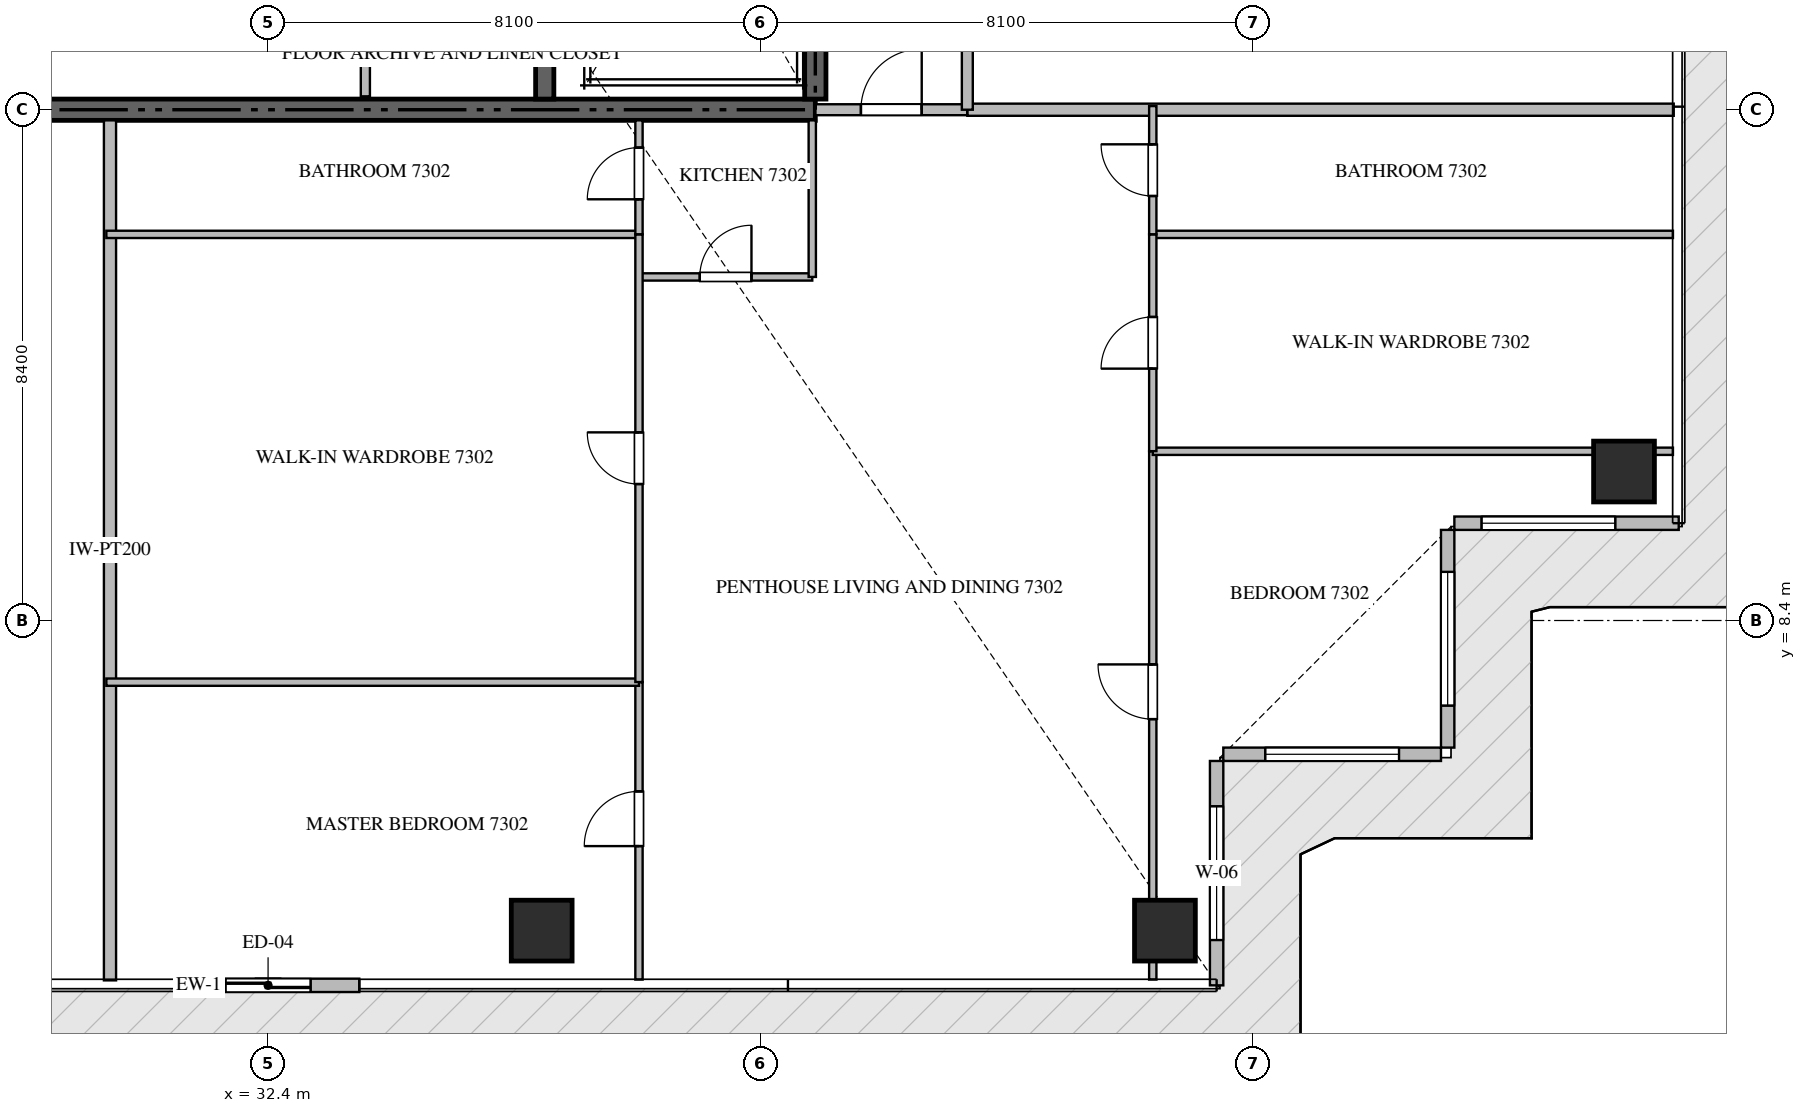
"""IFC4 building model, lengths in metres.
Left out: names, types, materials, properties, quantities, classifications, styles, units other than length and angle.
Written with IfcOpenShell. Run it as: python <this file> out.ifc"""

import sys

from ifc_helpers import new_model, si_unit, direction, frame, frame_2d, origin, origin_2d, place, context, subcontext, project, spatial, rectangle, extrude, source, transform, mapped, element, fill, save


model = new_model("IFC4")
c1 = context("Model", 3, precision=1e-05, world=origin(), true_north=direction((0.0, 1.0)))
c2 = subcontext(c1, "Body", "Model", "MODEL_VIEW")
j1 = project(units=[si_unit("LENGTHUNIT", "METRE"), si_unit("PLANEANGLEUNIT", "RADIAN")], contexts=[c1])
p1 = place(None, origin())
s1 = spatial("IfcSite", under=j1, at=p1, CompositionType="ELEMENT")
p2 = place(p1, origin())
s2 = spatial("IfcBuilding", under=s1, at=p2, CompositionType="ELEMENT")
p3 = place(p2, frame((0.0, 0.0, 293.45)))
s3 = spatial("IfcBuildingStorey", under=s2, at=p3, CompositionType="ELEMENT", Elevation=293.45)
p4 = place(p3, frame((23.4, 16.8, -0.26), z_axis=(0.0, 0.0, 1.0), x_axis=(1.0, 0.0, 0.0)))
e1 = element("IfcWall", 1, at=p4, inside=s3, PredefinedType="SHEAR", context=c2, shape_type="SweptSolid", body=[
    extrude(rectangle(XDim=18.0, YDim=0.35, at=frame_2d((9.0, 0.0))), origin(), (0.0, 0.0, 1.0), 4.048),
])
p5 = place(p3, frame((41.4, 16.975, -0.26), z_axis=(0.0, 0.0, 1.0), x_axis=(0.0, 1.0, 0.0)))
e2 = element("IfcWall", 2, at=p5, inside=s3, PredefinedType="SHEAR", context=c2, shape_type="SweptSolid", body=[
    extrude(rectangle(XDim=8.375, YDim=0.35, at=frame_2d((4.188, 0.0))), origin(), (0.0, 0.0, 1.0), 4.048),
])
p6 = place(p3, frame((36.95, 16.975, -0.26), z_axis=(0.0, 0.0, 1.0), x_axis=(0.0, 1.0, 0.0)))
e3 = element("IfcWall", 3, at=p6, inside=s3, PredefinedType="SHEAR", context=c2, shape_type="SweptSolid", body=[
    extrude(rectangle(XDim=8.375, YDim=0.3, at=frame_2d((4.188, 0.0))), origin(), (0.0, 0.0, 1.0), 4.048),
])
m1 = source(origin(), c2, "Body", "SweptSolid", [
    extrude(rectangle(XDim=1.0, YDim=1.0, at=origin_2d()), origin(), (0.0, 0.0, 1.0), 4.05),
])
for number, where, z_axis, x_axis in (
    (4, (36.9, 3.3, -0.26), (0.0, 0.0, 1.0), (1.0, 0.0, 0.0)),
    (5, (47.15, 3.3, -0.26), (0.0, 0.0, 1.0), (1.0, 0.0, 0.0)),
    (6, (54.7, 10.85, -0.26), (0.0, 0.0, 1.0), (1.0, 0.0, 0.0)),
):
    element("IfcColumn", number, at=place(p3, frame(where, z_axis=z_axis, x_axis=x_axis)), inside=s3, PredefinedType="COLUMN", context=c2, shape_type="MappedRepresentation", body=[
        mapped(m1, transform((0.0, 0.0, 0.0), scale=1.0)),
    ])
p7 = place(p3, frame((30.9, 2.4, 0.0), z_axis=(0.0, 0.0, 1.0), x_axis=(1.0, 0.0, 0.0)))
e7 = element("IfcWall", 7, at=p7, inside=s3, PredefinedType="ELEMENTEDWALL", context=c2, shape_type="SweptSolid", body=[
    extrude(rectangle(XDim=3.0, YDim=0.22, at=frame_2d((1.5, 0.0))), origin(), (0.0, 0.0, 1.0), 3.775),
])
p8 = place(p7, frame((0.8, 0.0, 0.0)))
e8 = element("IfcOpeningElement", 8, at=p8, cuts=e7, PredefinedType="OPENING", context=c2, shape_type="SweptSolid", body=[
    extrude(rectangle(XDim=1.4, YDim=2.25, at=frame_2d((0.7, 1.125))), frame((0.0, 0.12, 0.0), z_axis=(0.0, -1.0, 0.0), x_axis=(1.0, 0.0, 0.0)), (0.0, 0.0, 1.0), 0.24),
])
p9 = place(p3, frame((48.0, 2.4, 0.0), z_axis=(0.0, 0.0, 1.0), x_axis=(0.0, 1.0, 0.0)))
e9 = element("IfcWall", 9, at=p9, inside=s3, PredefinedType="ELEMENTEDWALL", context=c2, shape_type="SweptSolid", body=[
    extrude(rectangle(XDim=3.69, YDim=0.22, at=frame_2d((1.845, 0.0))), origin(), (0.0, 0.0, 1.0), 3.775),
])
p10 = place(p9, frame((0.745, 0.0, 0.65)))
e10 = element("IfcOpeningElement", 10, at=p10, cuts=e9, PredefinedType="OPENING", context=c2, shape_type="SweptSolid", body=[
    extrude(rectangle(XDim=2.2, YDim=2.4, at=frame_2d((1.1, 1.2))), frame((0.0, 0.12, 0.0), z_axis=(0.0, -1.0, 0.0), x_axis=(1.0, 0.0, 0.0)), (0.0, 0.0, 1.0), 0.24),
])
p11 = place(p3, frame((48.11, 6.2, 0.0), z_axis=(0.0, 0.0, 1.0), x_axis=(1.0, 0.0, 0.0)))
e11 = element("IfcWall", 11, at=p11, inside=s3, PredefinedType="ELEMENTEDWALL", context=c2, shape_type="SweptSolid", body=[
    extrude(rectangle(XDim=3.58, YDim=0.22, at=frame_2d((1.79, 0.0))), origin(), (0.0, 0.0, 1.0), 3.775),
])
p12 = place(p11, frame((0.69, 0.0, 0.65)))
e12 = element("IfcOpeningElement", 12, at=p12, cuts=e11, PredefinedType="OPENING", context=c2, shape_type="SweptSolid", body=[
    extrude(rectangle(XDim=2.2, YDim=2.4, at=frame_2d((1.1, 1.2))), frame((0.0, 0.12, 0.0), z_axis=(0.0, -1.0, 0.0), x_axis=(1.0, 0.0, 0.0)), (0.0, 0.0, 1.0), 0.24),
])
p13 = place(p3, frame((51.8, 6.31, 0.0), z_axis=(0.0, 0.0, 1.0), x_axis=(0.0, 1.0, 0.0)))
e13 = element("IfcWall", 13, at=p13, inside=s3, PredefinedType="ELEMENTEDWALL", context=c2, shape_type="SweptSolid", body=[
    extrude(rectangle(XDim=3.58, YDim=0.22, at=frame_2d((1.79, 0.0))), origin(), (0.0, 0.0, 1.0), 3.775),
])
p14 = place(p13, frame((0.69, 0.0, 0.65)))
e14 = element("IfcOpeningElement", 14, at=p14, cuts=e13, PredefinedType="OPENING", context=c2, shape_type="SweptSolid", body=[
    extrude(rectangle(XDim=2.2, YDim=2.4, at=frame_2d((1.1, 1.2))), frame((0.0, 0.12, 0.0), z_axis=(0.0, -1.0, 0.0), x_axis=(1.0, 0.0, 0.0)), (0.0, 0.0, 1.0), 0.24),
])
p15 = place(p3, frame((51.91, 10.0, 0.0), z_axis=(0.0, 0.0, 1.0), x_axis=(1.0, 0.0, 0.0)))
e15 = element("IfcWall", 15, at=p15, inside=s3, PredefinedType="ELEMENTEDWALL", context=c2, shape_type="SweptSolid", body=[
    extrude(rectangle(XDim=3.69, YDim=0.22, at=frame_2d((1.845, 0.0))), origin(), (0.0, 0.0, 1.0), 3.775),
])
p16 = place(p15, frame((0.447, 0.0, 0.65)))
e16 = element("IfcOpeningElement", 16, at=p16, cuts=e15, PredefinedType="OPENING", context=c2, shape_type="SweptSolid", body=[
    extrude(rectangle(XDim=2.2, YDim=2.4, at=frame_2d((1.1, 1.2))), frame((0.0, 0.12, 0.0), z_axis=(0.0, -1.0, 0.0), x_axis=(1.0, 0.0, 0.0)), (0.0, 0.0, 1.0), 0.24),
])
p17 = place(p3, frame((34.0, 17.02, 0.0), z_axis=(0.0, 0.0, 1.0), x_axis=(0.0, 1.0, 0.0)))
e17 = element("IfcWall", 17, at=p17, inside=s3, PredefinedType="PARTITIONING", context=c2, shape_type="SweptSolid", body=[
    extrude(rectangle(XDim=2.73, YDim=0.15, at=frame_2d((1.365, 0.0))), origin(), (0.0, 0.0, 1.0), 3.79),
])
p18 = place(p3, frame((29.8, 2.482, 0.0), z_axis=(0.0, 0.0, 1.0), x_axis=(0.0, 1.0, 0.0)))
e18 = element("IfcWall", 18, at=p18, inside=s3, PredefinedType="PARTITIONING", context=c2, shape_type="SweptSolid", body=[
    extrude(rectangle(XDim=14.143, YDim=0.2, at=frame_2d((7.072, 0.0))), origin(), (0.0, 0.0, 1.0), 3.79),
])
p19 = place(p3, frame((43.9, 16.8, 0.0), z_axis=(0.0, 0.0, 1.0), x_axis=(1.0, 0.0, 0.0)))
e19 = element("IfcWall", 19, at=p19, inside=s3, PredefinedType="PARTITIONING", context=c2, shape_type="SweptSolid", body=[
    extrude(rectangle(XDim=11.618, YDim=0.2, at=frame_2d((5.809, 0.0))), origin(), (0.0, 0.0, 1.0), 3.79),
])
p20 = place(p3, frame((41.402, 16.8, 0.0), z_axis=(0.0, 0.0, 1.0), x_axis=(1.0, 0.0, 0.0)))
e20 = element("IfcWall", 20, at=p20, inside=s3, PredefinedType="PARTITIONING", context=c2, shape_type="SweptSolid", body=[
    extrude(rectangle(XDim=2.496, YDim=0.18, at=frame_2d((1.248, 0.0))), origin(), (0.0, 0.0, 1.0), 3.79),
])
p21 = place(p20, frame((0.748, 0.0, 0.0)))
e21 = element("IfcOpeningElement", 21, at=p21, cuts=e20, PredefinedType="OPENING", context=c2, shape_type="SweptSolid", body=[
    extrude(rectangle(XDim=1.0, YDim=2.15, at=frame_2d((0.5, 1.075))), frame((0.0, 0.1, 0.0), z_axis=(0.0, -1.0, 0.0), x_axis=(1.0, 0.0, 0.0)), (0.0, 0.0, 1.0), 0.2),
])
p22 = place(p3, frame((43.9, 16.8, 0.0), z_axis=(0.0, 0.0, 1.0), x_axis=(0.0, 1.0, 0.0)))
e22 = element("IfcWall", 22, at=p22, inside=s3, PredefinedType="PARTITIONING", context=c2, shape_type="SweptSolid", body=[
    extrude(rectangle(XDim=16.8, YDim=0.18, at=frame_2d((8.4, 0.0))), origin(), (0.0, 0.0, 1.0), 3.79),
])
p23 = place(p22, frame((1.3, 0.0, 0.0)))
e23 = element("IfcOpeningElement", 23, at=p23, cuts=e22, PredefinedType="OPENING", context=c2, shape_type="SweptSolid", body=[
    extrude(rectangle(XDim=1.0, YDim=2.15, at=frame_2d((0.5, 1.075))), frame((0.0, 0.1, 0.0), z_axis=(0.0, -1.0, 0.0), x_axis=(1.0, 0.0, 0.0)), (0.0, 0.0, 1.0), 0.2),
])
p24 = place(p3, frame((38.5, 14.05, 0.0), z_axis=(0.0, 0.0, 1.0), x_axis=(1.0, 0.0, 0.0)))
e24 = element("IfcWall", 24, at=p24, inside=s3, PredefinedType="PARTITIONING", context=c2, shape_type="SweptSolid", body=[
    extrude(rectangle(XDim=2.85, YDim=0.12, at=frame_2d((1.425, 0.0))), origin(), (0.0, 0.0, 1.0), 3.79),
])
p25 = place(p24, frame((1.0, 0.0, 0.0)))
e25 = element("IfcOpeningElement", 25, at=p25, cuts=e24, PredefinedType="OPENING", context=c2, shape_type="SweptSolid", body=[
    extrude(rectangle(XDim=0.85, YDim=2.1, at=frame_2d((0.425, 1.05))), frame((0.0, 0.07, 0.0), z_axis=(0.0, -1.0, 0.0), x_axis=(1.0, 0.0, 0.0)), (0.0, 0.0, 1.0), 0.14),
])
p26 = place(p3, frame((41.35, 14.05, 0.0), z_axis=(0.0, 0.0, 1.0), x_axis=(0.0, 1.0, 0.0)))
e26 = element("IfcWall", 26, at=p26, inside=s3, PredefinedType="PARTITIONING", context=c2, shape_type="SweptSolid", body=[
    extrude(rectangle(XDim=2.575, YDim=0.12, at=frame_2d((1.288, 0.0))), origin(), (0.0, 0.0, 1.0), 3.79),
])
p27 = place(p3, frame((38.5, 2.495, 0.0), z_axis=(0.0, 0.0, 1.0), x_axis=(0.0, 1.0, 0.0)))
e27 = element("IfcWall", 27, at=p27, inside=s3, PredefinedType="PARTITIONING", context=c2, shape_type="SweptSolid", body=[
    extrude(rectangle(XDim=4.891, YDim=0.12, at=frame_2d((2.445, 0.0))), origin(), (0.0, 0.0, 1.0), 3.79),
])
p28 = place(p27, frame((2.195, 0.0, 0.0)))
e28 = element("IfcOpeningElement", 28, at=p28, cuts=e27, PredefinedType="OPENING", context=c2, shape_type="SweptSolid", body=[
    extrude(rectangle(XDim=0.9, YDim=2.1, at=frame_2d((0.45, 1.05))), frame((0.0, 0.07, 0.0), z_axis=(0.0, -1.0, 0.0), x_axis=(1.0, 0.0, 0.0)), (0.0, 0.0, 1.0), 0.14),
])
for number, where, z_axis, x_axis in (
    (29, (29.74, 7.386, 0.0), (0.0, 0.0, 1.0), (1.0, 0.0, 0.0)),
    (30, (29.74, 14.75, 0.0), (0.0, 0.0, 1.0), (1.0, 0.0, 0.0)),
):
    element("IfcWall", number, at=place(p3, frame(where, z_axis=z_axis, x_axis=x_axis)), inside=s3, PredefinedType="PARTITIONING", context=c2, shape_type="SweptSolid", body=[
        extrude(rectangle(XDim=8.76, YDim=0.12, at=frame_2d((4.38, 0.0))), origin(), (0.0, 0.0, 1.0), 3.79),
    ])
p29 = place(p3, frame((38.5, 7.388, 0.0), z_axis=(0.0, 0.0, 1.0), x_axis=(0.0, 1.0, 0.0)))
e31 = element("IfcWall", 31, at=p29, inside=s3, PredefinedType="PARTITIONING", context=c2, shape_type="SweptSolid", body=[
    extrude(rectangle(XDim=7.362, YDim=0.12, at=frame_2d((3.681, 0.0))), origin(), (0.0, 0.0, 1.0), 3.79),
])
p30 = place(p29, frame((3.256, 0.0, 0.0)))
e32 = element("IfcOpeningElement", 32, at=p30, cuts=e31, PredefinedType="OPENING", context=c2, shape_type="SweptSolid", body=[
    extrude(rectangle(XDim=0.85, YDim=2.1, at=frame_2d((0.425, 1.05))), frame((0.0, 0.07, 0.0), z_axis=(0.0, -1.0, 0.0), x_axis=(1.0, 0.0, 0.0)), (0.0, 0.0, 1.0), 0.14),
])
p31 = place(p3, frame((38.5, 14.752, 0.0), z_axis=(0.0, 0.0, 1.0), x_axis=(0.0, 1.0, 0.0)))
e33 = element("IfcWall", 33, at=p31, inside=s3, PredefinedType="PARTITIONING", context=c2, shape_type="SweptSolid", body=[
    extrude(rectangle(XDim=1.873, YDim=0.12, at=frame_2d((0.937, 0.0))), origin(), (0.0, 0.0, 1.0), 3.79),
])
p32 = place(p31, frame((0.575, 0.0, 0.0)))
e34 = element("IfcOpeningElement", 34, at=p32, cuts=e33, PredefinedType="OPENING", context=c2, shape_type="SweptSolid", body=[
    extrude(rectangle(XDim=0.85, YDim=2.1, at=frame_2d((0.425, 1.05))), frame((0.0, 0.07, 0.0), z_axis=(0.0, -1.0, 0.0), x_axis=(1.0, 0.0, 0.0)), (0.0, 0.0, 1.0), 0.14),
])
p33 = place(p3, frame((46.95, 2.495, 0.0), z_axis=(0.0, 0.0, 1.0), x_axis=(0.0, 1.0, 0.0)))
e35 = element("IfcWall", 35, at=p33, inside=s3, PredefinedType="PARTITIONING", context=c2, shape_type="SweptSolid", body=[
    extrude(rectangle(XDim=8.688, YDim=0.12, at=frame_2d((4.344, 0.0))), origin(), (0.0, 0.0, 1.0), 3.292),
])
p34 = place(p33, frame((4.283, 0.0, 0.0)))
e36 = element("IfcOpeningElement", 36, at=p34, cuts=e35, PredefinedType="OPENING", context=c2, shape_type="SweptSolid", body=[
    extrude(rectangle(XDim=0.9, YDim=2.1, at=frame_2d((0.45, 1.05))), frame((0.0, 0.07, 0.0), z_axis=(0.0, -1.0, 0.0), x_axis=(1.0, 0.0, 0.0)), (0.0, 0.0, 1.0), 0.14),
])
for number, where, z_axis, x_axis in (
    (37, (46.95, 11.183, 0.0), (0.0, 0.0, 1.0), (1.0, 0.0, 0.0)),
    (38, (46.95, 14.75, 0.0), (0.0, 0.0, 1.0), (1.0, 0.0, 0.0)),
):
    element("IfcWall", number, at=place(p3, frame(where, z_axis=z_axis, x_axis=x_axis)), inside=s3, PredefinedType="PARTITIONING", context=c2, shape_type="SweptSolid", body=[
        extrude(rectangle(XDim=8.555, YDim=0.12, at=frame_2d((4.277, 0.0))), origin(), (0.0, 0.0, 1.0), 3.79),
    ])
p35 = place(p3, frame((46.95, 11.185, 0.0), z_axis=(0.0, 0.0, 1.0), x_axis=(0.0, 1.0, 0.0)))
e39 = element("IfcWall", 39, at=p35, inside=s3, PredefinedType="PARTITIONING", context=c2, shape_type="SweptSolid", body=[
    extrude(rectangle(XDim=3.565, YDim=0.12, at=frame_2d((1.782, 0.0))), origin(), (0.0, 0.0, 1.0), 3.372),
])
p36 = place(p35, frame((1.357, 0.0, 0.0)))
e40 = element("IfcOpeningElement", 40, at=p36, cuts=e39, PredefinedType="OPENING", context=c2, shape_type="SweptSolid", body=[
    extrude(rectangle(XDim=0.85, YDim=2.1, at=frame_2d((0.425, 1.05))), frame((0.0, 0.07, 0.0), z_axis=(0.0, -1.0, 0.0), x_axis=(1.0, 0.0, 0.0)), (0.0, 0.0, 1.0), 0.14),
])
p37 = place(p3, frame((46.95, 14.752, 0.0), z_axis=(0.0, 0.0, 1.0), x_axis=(0.0, 1.0, 0.0)))
e41 = element("IfcWall", 41, at=p37, inside=s3, PredefinedType="PARTITIONING", context=c2, shape_type="SweptSolid", body=[
    extrude(rectangle(XDim=2.108, YDim=0.12, at=frame_2d((1.054, 0.0))), origin(), (0.0, 0.0, 1.0), 3.372),
])
p38 = place(p37, frame((0.629, 0.0, 0.0)))
e42 = element("IfcOpeningElement", 42, at=p38, cuts=e41, PredefinedType="OPENING", context=c2, shape_type="SweptSolid", body=[
    extrude(rectangle(XDim=0.85, YDim=2.1, at=frame_2d((0.425, 1.05))), frame((0.0, 0.07, 0.0), z_axis=(0.0, -1.0, 0.0), x_axis=(1.0, 0.0, 0.0)), (0.0, 0.0, 1.0), 0.14),
])
m2 = source(origin(), c2, "Body", "SweptSolid", [
    extrude(rectangle(XDim=1.4, YDim=2.25, at=frame_2d((0.7, 1.125))), frame((0.0, 0.025, 0.0), z_axis=(0.0, -1.0, 0.0), x_axis=(1.0, 0.0, 0.0)), (0.0, 0.0, 1.0), 0.05),
])
p39 = place(p8, origin())
e43 = element("IfcDoor", 43, at=p39, inside=s3, OperationType="SLIDING_TO_LEFT", PredefinedType="DOOR", context=c2, shape_type="MappedRepresentation", body=[
    mapped(m2, transform((0.0, 0.0, 0.0), scale=1.0)),
])
fill(e8, e43)
m3 = source(origin(), c2, "Body", "SweptSolid", [
    extrude(rectangle(XDim=2.2, YDim=2.4, at=frame_2d((1.1, 1.2))), frame((0.0, 0.03, 0.0), z_axis=(0.0, -1.0, 0.0), x_axis=(1.0, 0.0, 0.0)), (0.0, 0.0, 1.0), 0.06),
])
p40 = place(p10, origin())
e44 = element("IfcWindow", 44, at=p40, inside=s3, PartitioningType="SINGLE_PANEL", PredefinedType="WINDOW", context=c2, shape_type="MappedRepresentation", body=[
    mapped(m3, transform((0.0, 0.0, 0.0), scale=1.0)),
])
fill(e10, e44)
p41 = place(p12, origin())
e45 = element("IfcWindow", 45, at=p41, inside=s3, PartitioningType="SINGLE_PANEL", PredefinedType="WINDOW", context=c2, shape_type="MappedRepresentation", body=[
    mapped(m3, transform((0.0, 0.0, 0.0), scale=1.0)),
])
fill(e12, e45)
p42 = place(p14, origin())
e46 = element("IfcWindow", 46, at=p42, inside=s3, PartitioningType="SINGLE_PANEL", PredefinedType="WINDOW", context=c2, shape_type="MappedRepresentation", body=[
    mapped(m3, transform((0.0, 0.0, 0.0), scale=1.0)),
])
fill(e14, e46)
p43 = place(p16, origin())
e47 = element("IfcWindow", 47, at=p43, inside=s3, PartitioningType="SINGLE_PANEL", PredefinedType="WINDOW", context=c2, shape_type="MappedRepresentation", body=[
    mapped(m3, transform((0.0, 0.0, 0.0), scale=1.0)),
])
fill(e16, e47)
m4 = source(origin(), c2, "Body", "SweptSolid", [
    extrude(rectangle(XDim=1.0, YDim=2.15, at=frame_2d((0.5, 1.075))), frame((0.0, 0.025, 0.0), z_axis=(0.0, -1.0, 0.0), x_axis=(1.0, 0.0, 0.0)), (0.0, 0.0, 1.0), 0.05),
])
p44 = place(p21, origin())
e48 = element("IfcDoor", 48, at=p44, inside=s3, OperationType="SINGLE_SWING_RIGHT", PredefinedType="DOOR", context=c2, shape_type="MappedRepresentation", body=[
    mapped(m4, transform((0.0, 0.0, 0.0), scale=1.0)),
])
fill(e21, e48)
m5 = source(origin(), c2, "Body", "SweptSolid", [
    extrude(rectangle(XDim=0.85, YDim=2.1, at=frame_2d((0.425, 1.05))), frame((0.0, 0.025, 0.0), z_axis=(0.0, -1.0, 0.0), x_axis=(1.0, 0.0, 0.0)), (0.0, 0.0, 1.0), 0.05),
])
p45 = place(p25, origin())
e49 = element("IfcDoor", 49, at=p45, inside=s3, OperationType="SINGLE_SWING_RIGHT", PredefinedType="DOOR", context=c2, shape_type="MappedRepresentation", body=[
    mapped(m5, transform((0.0, 0.0, 0.0), scale=1.0)),
])
fill(e25, e49)
m6 = source(origin(), c2, "Body", "SweptSolid", [
    extrude(rectangle(XDim=0.9, YDim=2.1, at=frame_2d((0.45, 1.05))), frame((0.0, 0.025, 0.0), z_axis=(0.0, -1.0, 0.0), x_axis=(1.0, 0.0, 0.0)), (0.0, 0.0, 1.0), 0.05),
])
p46 = place(p28, origin())
e50 = element("IfcDoor", 50, at=p46, inside=s3, OperationType="SINGLE_SWING_LEFT", PredefinedType="DOOR", context=c2, shape_type="MappedRepresentation", body=[
    mapped(m6, transform((0.0, 0.0, 0.0), scale=1.0)),
])
fill(e28, e50)
p47 = place(p30, origin())
e51 = element("IfcDoor", 51, at=p47, inside=s3, OperationType="SINGLE_SWING_RIGHT", PredefinedType="DOOR", context=c2, shape_type="MappedRepresentation", body=[
    mapped(m5, transform((0.0, 0.0, 0.0), scale=1.0)),
])
fill(e32, e51)
p48 = place(p32, origin())
e52 = element("IfcDoor", 52, at=p48, inside=s3, OperationType="SINGLE_SWING_LEFT", PredefinedType="DOOR", context=c2, shape_type="MappedRepresentation", body=[
    mapped(m5, transform((0.0, 0.0, 0.0), scale=1.0)),
])
fill(e34, e52)
p49 = place(p34, origin())
e53 = element("IfcDoor", 53, at=p49, inside=s3, OperationType="SINGLE_SWING_RIGHT", PredefinedType="DOOR", context=c2, shape_type="MappedRepresentation", body=[
    mapped(m6, transform((0.0, 0.0, 0.0), scale=1.0)),
])
fill(e36, e53)
p50 = place(p36, origin())
e54 = element("IfcDoor", 54, at=p50, inside=s3, OperationType="SINGLE_SWING_LEFT", PredefinedType="DOOR", context=c2, shape_type="MappedRepresentation", body=[
    mapped(m5, transform((0.0, 0.0, 0.0), scale=1.0)),
])
fill(e40, e54)
p51 = place(p38, origin())
e55 = element("IfcDoor", 55, at=p51, inside=s3, OperationType="SINGLE_SWING_RIGHT", PredefinedType="DOOR", context=c2, shape_type="MappedRepresentation", body=[
    mapped(m5, transform((0.0, 0.0, 0.0), scale=1.0)),
])
fill(e42, e55)
save(model, sys.argv[1])
